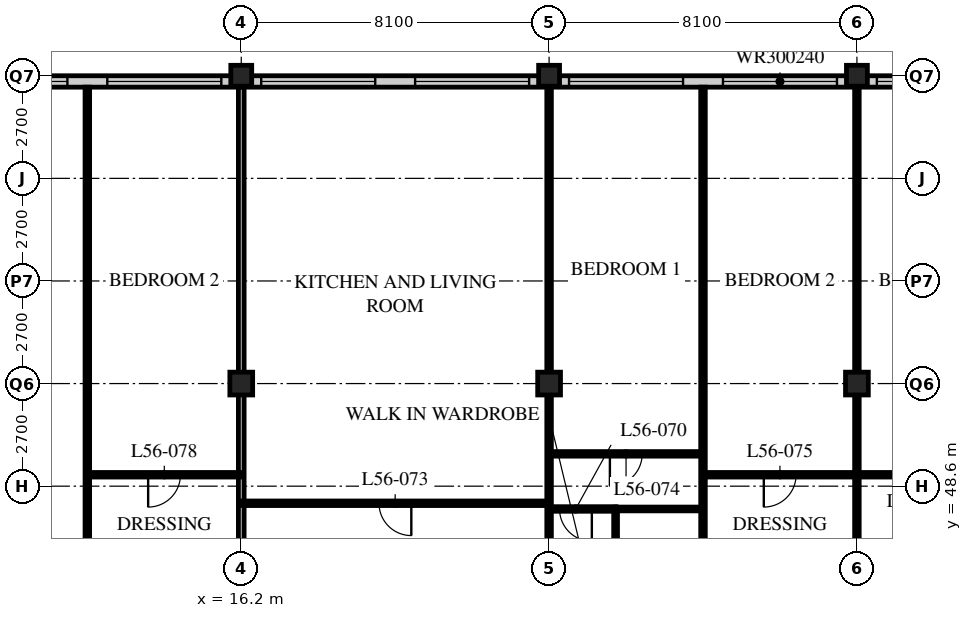
"""IFC4 building model, lengths in metres.
Left out: names, types, materials, properties, quantities, classifications, styles, units other than length and angle.
Written with IfcOpenShell. Run it as: python <this file> out.ifc"""

import sys

from ifc_helpers import new_model, si_unit, direction, frame, frame_2d, origin, origin_2d, place, context, subcontext, project, spatial, rectangle, hollow_rectangle, extrude, element, fill, save


model = new_model("IFC4")
c1 = context("Model", 3, precision=1e-05, world=origin(), true_north=direction((0.0, 1.0)))
c2 = subcontext(c1, "Body", "Model", "MODEL_VIEW")
j1 = project(units=[si_unit("LENGTHUNIT", "METRE"), si_unit("PLANEANGLEUNIT", "RADIAN")], contexts=[c1])
p1 = place(None, origin())
s1 = spatial("IfcSite", under=j1, at=p1, CompositionType="ELEMENT")
p2 = place(p1, origin())
s2 = spatial("IfcBuilding", under=s1, at=p2, CompositionType="ELEMENT")
p3 = place(p2, frame((0.0, 0.0, 217.2)))
s3 = spatial("IfcBuildingStorey", under=s2, at=p3, CompositionType="ELEMENT", Elevation=217.2)
p4 = place(p3, frame((16.2, 51.3, 0.0), z_axis=(0.0, 0.0, 1.0), x_axis=(1.0, 0.0, 0.0)))
e1 = element("IfcColumn", 1, at=p4, inside=s3, PredefinedType="COLUMN", context=c2, shape_type="SweptSolid", body=[
    extrude(hollow_rectangle(XDim=0.6, YDim=0.6, WallThickness=0.05, at=origin_2d()), origin(), (0.0, 0.0, 1.0), 3.6),
])
p5 = place(p3, frame((16.2, 59.4, 0.0), z_axis=(0.0, 0.0, 1.0), x_axis=(1.0, 0.0, 0.0)))
e2 = element("IfcColumn", 2, at=p5, inside=s3, PredefinedType="COLUMN", context=c2, shape_type="SweptSolid", body=[
    extrude(hollow_rectangle(XDim=0.55, YDim=0.55, WallThickness=0.045, at=origin_2d()), origin(), (0.0, 0.0, 1.0), 3.6),
])
p6 = place(p3, frame((24.3, 51.3, 0.0), z_axis=(0.0, 0.0, 1.0), x_axis=(1.0, 0.0, 0.0)))
e3 = element("IfcColumn", 3, at=p6, inside=s3, PredefinedType="COLUMN", context=c2, shape_type="SweptSolid", body=[
    extrude(hollow_rectangle(XDim=0.6, YDim=0.6, WallThickness=0.05, at=origin_2d()), origin(), (0.0, 0.0, 1.0), 3.6),
])
p7 = place(p3, frame((24.3, 59.4, 0.0), z_axis=(0.0, 0.0, 1.0), x_axis=(1.0, 0.0, 0.0)))
e4 = element("IfcColumn", 4, at=p7, inside=s3, PredefinedType="COLUMN", context=c2, shape_type="SweptSolid", body=[
    extrude(hollow_rectangle(XDim=0.55, YDim=0.55, WallThickness=0.045, at=origin_2d()), origin(), (0.0, 0.0, 1.0), 3.6),
])
p8 = place(p3, frame((32.4, 51.3, 0.0), z_axis=(0.0, 0.0, 1.0), x_axis=(1.0, 0.0, 0.0)))
e5 = element("IfcColumn", 5, at=p8, inside=s3, PredefinedType="COLUMN", context=c2, shape_type="SweptSolid", body=[
    extrude(hollow_rectangle(XDim=0.6, YDim=0.6, WallThickness=0.05, at=origin_2d()), origin(), (0.0, 0.0, 1.0), 3.6),
])
p9 = place(p3, frame((32.4, 59.4, 0.0), z_axis=(0.0, 0.0, 1.0), x_axis=(1.0, 0.0, 0.0)))
e6 = element("IfcColumn", 6, at=p9, inside=s3, PredefinedType="COLUMN", context=c2, shape_type="SweptSolid", body=[
    extrude(hollow_rectangle(XDim=0.55, YDim=0.55, WallThickness=0.045, at=origin_2d()), origin(), (0.0, 0.0, 1.0), 3.6),
])
p10 = place(p3, frame((48.3, 59.25, 0.0), z_axis=(0.0, 0.0, 1.0), x_axis=(-1.0, 0.0, 0.0)))
e7 = element("IfcWall", 7, at=p10, inside=s3, PredefinedType="SOLIDWALL", context=c2, shape_type="SweptSolid", body=[
    extrude(rectangle(XDim=40.2, YDim=0.3, at=frame_2d((20.1, 0.0))), origin(), (0.0, 0.0, 1.0), 3.39),
])
p11 = place(p10, frame((0.225, 0.0, 0.6)))
e8 = element("IfcOpeningElement", 8, at=p11, cuts=e7, PredefinedType="OPENING", context=c2, shape_type="SweptSolid", body=[
    extrude(rectangle(XDim=3.0, YDim=2.4, at=frame_2d((1.5, 1.2))), frame((0.0, 0.16, 0.0), z_axis=(0.0, -1.0, 0.0), x_axis=(1.0, 0.0, 0.0)), (0.0, 0.0, 1.0), 0.32),
])
p12 = place(p10, frame((4.275, 0.0, 0.6)))
e9 = element("IfcOpeningElement", 9, at=p12, cuts=e7, PredefinedType="OPENING", context=c2, shape_type="SweptSolid", body=[
    extrude(rectangle(XDim=3.0, YDim=2.4, at=frame_2d((1.5, 1.2))), frame((0.0, 0.16, 0.0), z_axis=(0.0, -1.0, 0.0), x_axis=(1.0, 0.0, 0.0)), (0.0, 0.0, 1.0), 0.32),
])
p13 = place(p10, frame((8.325, 0.0, 0.6)))
e10 = element("IfcOpeningElement", 10, at=p13, cuts=e7, PredefinedType="OPENING", context=c2, shape_type="SweptSolid", body=[
    extrude(rectangle(XDim=3.0, YDim=2.4, at=frame_2d((1.5, 1.2))), frame((0.0, 0.16, 0.0), z_axis=(0.0, -1.0, 0.0), x_axis=(1.0, 0.0, 0.0)), (0.0, 0.0, 1.0), 0.32),
])
p14 = place(p10, frame((12.375, 0.0, 0.6)))
e11 = element("IfcOpeningElement", 11, at=p14, cuts=e7, PredefinedType="OPENING", context=c2, shape_type="SweptSolid", body=[
    extrude(rectangle(XDim=3.0, YDim=2.4, at=frame_2d((1.5, 1.2))), frame((0.0, 0.16, 0.0), z_axis=(0.0, -1.0, 0.0), x_axis=(1.0, 0.0, 0.0)), (0.0, 0.0, 1.0), 0.32),
])
p15 = place(p10, frame((16.425, 0.0, 0.6)))
e12 = element("IfcOpeningElement", 12, at=p15, cuts=e7, PredefinedType="OPENING", context=c2, shape_type="SweptSolid", body=[
    extrude(rectangle(XDim=3.0, YDim=2.4, at=frame_2d((1.5, 1.2))), frame((0.0, 0.16, 0.0), z_axis=(0.0, -1.0, 0.0), x_axis=(1.0, 0.0, 0.0)), (0.0, 0.0, 1.0), 0.32),
])
p16 = place(p10, frame((20.475, 0.0, 0.6)))
e13 = element("IfcOpeningElement", 13, at=p16, cuts=e7, PredefinedType="OPENING", context=c2, shape_type="SweptSolid", body=[
    extrude(rectangle(XDim=3.0, YDim=2.4, at=frame_2d((1.5, 1.2))), frame((0.0, 0.16, 0.0), z_axis=(0.0, -1.0, 0.0), x_axis=(1.0, 0.0, 0.0)), (0.0, 0.0, 1.0), 0.32),
])
p17 = place(p10, frame((24.525, 0.0, 0.6)))
e14 = element("IfcOpeningElement", 14, at=p17, cuts=e7, PredefinedType="OPENING", context=c2, shape_type="SweptSolid", body=[
    extrude(rectangle(XDim=3.0, YDim=2.4, at=frame_2d((1.5, 1.2))), frame((0.0, 0.16, 0.0), z_axis=(0.0, -1.0, 0.0), x_axis=(1.0, 0.0, 0.0)), (0.0, 0.0, 1.0), 0.32),
])
p18 = place(p10, frame((28.575, 0.0, 0.6)))
e15 = element("IfcOpeningElement", 15, at=p18, cuts=e7, PredefinedType="OPENING", context=c2, shape_type="SweptSolid", body=[
    extrude(rectangle(XDim=3.0, YDim=2.4, at=frame_2d((1.5, 1.2))), frame((0.0, 0.16, 0.0), z_axis=(0.0, -1.0, 0.0), x_axis=(1.0, 0.0, 0.0)), (0.0, 0.0, 1.0), 0.32),
])
p19 = place(p10, frame((32.625, 0.0, 0.6)))
e16 = element("IfcOpeningElement", 16, at=p19, cuts=e7, PredefinedType="OPENING", context=c2, shape_type="SweptSolid", body=[
    extrude(rectangle(XDim=3.0, YDim=2.4, at=frame_2d((1.5, 1.2))), frame((0.0, 0.16, 0.0), z_axis=(0.0, -1.0, 0.0), x_axis=(1.0, 0.0, 0.0)), (0.0, 0.0, 1.0), 0.32),
])
p20 = place(p10, frame((36.675, 0.0, 0.6)))
e17 = element("IfcOpeningElement", 17, at=p20, cuts=e7, PredefinedType="OPENING", context=c2, shape_type="SweptSolid", body=[
    extrude(rectangle(XDim=3.0, YDim=2.4, at=frame_2d((1.5, 1.2))), frame((0.0, 0.16, 0.0), z_axis=(0.0, -1.0, 0.0), x_axis=(1.0, 0.0, 0.0)), (0.0, 0.0, 1.0), 0.32),
])
p21 = place(p3, frame((26.05, 45.6, 0.0), z_axis=(0.0, 0.0, 1.0), x_axis=(0.0, 1.0, 0.0)))
e18 = element("IfcWall", 18, at=p21, inside=s3, PredefinedType="PARTITIONING", context=c2, shape_type="SweptSolid", body=[
    extrude(rectangle(XDim=2.4, YDim=0.1, at=frame_2d((1.2, 0.0))), origin(), (0.0, 0.0, 1.0), 3.39),
])
p22 = place(p21, frame((0.8, 0.0, 0.0)))
e19 = element("IfcOpeningElement", 19, at=p22, cuts=e18, PredefinedType="OPENING", context=c2, shape_type="SweptSolid", body=[
    extrude(rectangle(XDim=0.8, YDim=2.1, at=frame_2d((0.4, 1.05))), frame((0.0, 0.06, 0.0), z_axis=(0.0, -1.0, 0.0), x_axis=(1.0, 0.0, 0.0)), (0.0, 0.0, 1.0), 0.12),
])
p23 = place(p3, frame((26.05, 48.0, 0.0), z_axis=(0.0, 0.0, 1.0), x_axis=(1.0, 0.0, 0.0)))
e20 = element("IfcWall", 20, at=p23, inside=s3, PredefinedType="PARTITIONING", context=c2, shape_type="SweptSolid", body=[
    extrude(rectangle(XDim=2.3, YDim=0.1, at=frame_2d((1.15, 0.0))), origin(), (0.0, 0.0, 1.0), 3.39),
])
p24 = place(p3, frame((24.3, 45.6, 0.0), z_axis=(0.0, 0.0, 1.0), x_axis=(0.0, 1.0, 0.0)))
e21 = element("IfcWall", 21, at=p24, inside=s3, PredefinedType="PARTITIONING", context=c2, shape_type="SweptSolid", body=[
    extrude(rectangle(XDim=13.5, YDim=0.12, at=frame_2d((6.75, 0.0))), origin(), (0.0, 0.0, 1.0), 2.778),
])
p25 = place(p3, frame((28.35, 45.6, 0.0), z_axis=(0.0, 0.0, 1.0), x_axis=(0.0, 1.0, 0.0)))
e22 = element("IfcWall", 22, at=p25, inside=s3, PredefinedType="PARTITIONING", context=c2, shape_type="SweptSolid", body=[
    extrude(rectangle(XDim=13.5, YDim=0.12, at=frame_2d((6.75, 0.0))), origin(), (0.0, 0.0, 1.0), 3.39),
])
p26 = place(p3, frame((32.4, 45.6, 0.0), z_axis=(0.0, 0.0, 1.0), x_axis=(0.0, 1.0, 0.0)))
e23 = element("IfcWall", 23, at=p26, inside=s3, PredefinedType="PARTITIONING", context=c2, shape_type="SweptSolid", body=[
    extrude(rectangle(XDim=13.5, YDim=0.12, at=frame_2d((6.75, 0.0))), origin(), (0.0, 0.0, 1.0), 2.778),
])
p27 = place(p3, frame((12.15, 45.6, 0.0), z_axis=(0.0, 0.0, 1.0), x_axis=(0.0, 1.0, 0.0)))
e24 = element("IfcWall", 24, at=p27, inside=s3, PredefinedType="PARTITIONING", context=c2, shape_type="SweptSolid", body=[
    extrude(rectangle(XDim=13.5, YDim=0.12, at=frame_2d((6.75, 0.0))), origin(), (0.0, 0.0, 1.0), 3.39),
])
p28 = place(p3, frame((16.2, 43.2, 0.0), z_axis=(0.0, 0.0, 1.0), x_axis=(0.0, 1.0, 0.0)))
e25 = element("IfcWall", 25, at=p28, inside=s3, PredefinedType="PARTITIONING", context=c2, shape_type="SweptSolid", body=[
    extrude(rectangle(XDim=15.9, YDim=0.15, at=frame_2d((7.95, 0.0))), origin(), (0.0, 0.0, 1.0), 2.778),
])
p29 = place(p3, frame((24.3, 48.0, 0.0), z_axis=(0.0, 0.0, 1.0), x_axis=(1.0, 0.0, 0.0)))
e26 = element("IfcWall", 26, at=p29, inside=s3, PredefinedType="PARTITIONING", context=c2, shape_type="SweptSolid", body=[
    extrude(rectangle(XDim=1.76, YDim=0.12, at=frame_2d((0.88, 0.0))), origin(), (0.0, 0.0, 1.0), 3.39),
])
p30 = place(p29, frame((0.275, 0.0, 0.0)))
e27 = element("IfcOpeningElement", 27, at=p30, cuts=e26, PredefinedType="OPENING", context=c2, shape_type="SweptSolid", body=[
    extrude(rectangle(XDim=0.85, YDim=2.1, at=frame_2d((0.425, 1.05))), frame((0.0, 0.07, 0.0), z_axis=(0.0, -1.0, 0.0), x_axis=(1.0, 0.0, 0.0)), (0.0, 0.0, 1.0), 0.14),
])
p31 = place(p3, frame((16.2, 48.15, 0.0), z_axis=(0.0, 0.0, 1.0), x_axis=(1.0, 0.0, 0.0)))
e28 = element("IfcWall", 28, at=p31, inside=s3, PredefinedType="PARTITIONING", context=c2, shape_type="SweptSolid", body=[
    extrude(rectangle(XDim=8.1, YDim=0.12, at=frame_2d((4.05, 0.0))), origin(), (0.0, 0.0, 1.0), 3.39),
])
p32 = place(p31, frame((3.625, 0.0, 0.0)))
e29 = element("IfcOpeningElement", 29, at=p32, cuts=e28, PredefinedType="OPENING", context=c2, shape_type="SweptSolid", body=[
    extrude(rectangle(XDim=0.85, YDim=2.1, at=frame_2d((0.425, 1.05))), frame((0.0, 0.07, 0.0), z_axis=(0.0, -1.0, 0.0), x_axis=(1.0, 0.0, 0.0)), (0.0, 0.0, 1.0), 0.14),
])
p33 = place(p3, frame((24.3, 49.45, 0.0), z_axis=(0.0, 0.0, 1.0), x_axis=(1.0, 0.0, 0.0)))
e30 = element("IfcWall", 30, at=p33, inside=s3, PredefinedType="PARTITIONING", context=c2, shape_type="SweptSolid", body=[
    extrude(rectangle(XDim=4.05, YDim=0.12, at=frame_2d((2.025, 0.0))), origin(), (0.0, 0.0, 1.0), 3.39),
])
p34 = place(p33, frame((1.6, 0.0, 0.0)))
e31 = element("IfcOpeningElement", 31, at=p34, cuts=e30, PredefinedType="OPENING", context=c2, shape_type="SweptSolid", body=[
    extrude(rectangle(XDim=0.85, YDim=2.1, at=frame_2d((0.425, 1.05))), frame((0.0, 0.07, 0.0), z_axis=(0.0, -1.0, 0.0), x_axis=(1.0, 0.0, 0.0)), (0.0, 0.0, 1.0), 0.14),
])
p35 = place(p3, frame((28.35, 48.9, 0.0), z_axis=(0.0, 0.0, 1.0), x_axis=(1.0, 0.0, 0.0)))
e32 = element("IfcWall", 32, at=p35, inside=s3, PredefinedType="PARTITIONING", context=c2, shape_type="SweptSolid", body=[
    extrude(rectangle(XDim=8.1, YDim=0.12, at=frame_2d((4.05, 0.0))), origin(), (0.0, 0.0, 1.0), 3.39),
])
p36 = place(p35, frame((1.6, 0.0, 0.0)))
e33 = element("IfcOpeningElement", 33, at=p36, cuts=e32, PredefinedType="OPENING", context=c2, shape_type="SweptSolid", body=[
    extrude(rectangle(XDim=0.85, YDim=2.1, at=frame_2d((0.425, 1.05))), frame((0.0, 0.07, 0.0), z_axis=(0.0, -1.0, 0.0), x_axis=(1.0, 0.0, 0.0)), (0.0, 0.0, 1.0), 0.14),
])
p37 = place(p35, frame((5.65, 0.0, 0.0)))
e34 = element("IfcOpeningElement", 34, at=p37, cuts=e32, PredefinedType="OPENING", context=c2, shape_type="SweptSolid", body=[
    extrude(rectangle(XDim=0.85, YDim=2.1, at=frame_2d((0.425, 1.05))), frame((0.0, 0.07, 0.0), z_axis=(0.0, -1.0, 0.0), x_axis=(1.0, 0.0, 0.0)), (0.0, 0.0, 1.0), 0.14),
])
p38 = place(p3, frame((12.15, 48.9, 0.0), z_axis=(0.0, 0.0, 1.0), x_axis=(1.0, 0.0, 0.0)))
e35 = element("IfcWall", 35, at=p38, inside=s3, PredefinedType="PARTITIONING", context=c2, shape_type="SweptSolid", body=[
    extrude(rectangle(XDim=4.05, YDim=0.12, at=frame_2d((2.025, 0.0))), origin(), (0.0, 0.0, 1.0), 3.39),
])
p39 = place(p38, frame((1.6, 0.0, 0.0)))
e36 = element("IfcOpeningElement", 36, at=p39, cuts=e35, PredefinedType="OPENING", context=c2, shape_type="SweptSolid", body=[
    extrude(rectangle(XDim=0.85, YDim=2.1, at=frame_2d((0.425, 1.05))), frame((0.0, 0.07, 0.0), z_axis=(0.0, -1.0, 0.0), x_axis=(1.0, 0.0, 0.0)), (0.0, 0.0, 1.0), 0.14),
])
p40 = place(p14, origin())
e37 = element("IfcWindow", 37, at=p40, inside=s3, PartitioningType="SINGLE_PANEL", PredefinedType="WINDOW", context=c2, shape_type="SweptSolid", body=[
    extrude(rectangle(XDim=3.0, YDim=2.4, at=frame_2d((1.5, 1.2))), frame((0.0, 0.03, 0.0), z_axis=(0.0, -1.0, 0.0), x_axis=(1.0, 0.0, 0.0)), (0.0, 0.0, 1.0), 0.06),
])
fill(e11, e37)
p41 = place(p15, origin())
e38 = element("IfcWindow", 38, at=p41, inside=s3, PartitioningType="SINGLE_PANEL", PredefinedType="WINDOW", context=c2, shape_type="SweptSolid", body=[
    extrude(rectangle(XDim=3.0, YDim=2.4, at=frame_2d((1.5, 1.2))), frame((0.0, 0.03, 0.0), z_axis=(0.0, -1.0, 0.0), x_axis=(1.0, 0.0, 0.0)), (0.0, 0.0, 1.0), 0.06),
])
fill(e12, e38)
p42 = place(p16, origin())
e39 = element("IfcWindow", 39, at=p42, inside=s3, PartitioningType="SINGLE_PANEL", PredefinedType="WINDOW", context=c2, shape_type="SweptSolid", body=[
    extrude(rectangle(XDim=3.0, YDim=2.4, at=frame_2d((1.5, 1.2))), frame((0.0, 0.03, 0.0), z_axis=(0.0, -1.0, 0.0), x_axis=(1.0, 0.0, 0.0)), (0.0, 0.0, 1.0), 0.06),
])
fill(e13, e39)
p43 = place(p17, origin())
e40 = element("IfcWindow", 40, at=p43, inside=s3, PartitioningType="SINGLE_PANEL", PredefinedType="WINDOW", context=c2, shape_type="SweptSolid", body=[
    extrude(rectangle(XDim=3.0, YDim=2.4, at=frame_2d((1.5, 1.2))), frame((0.0, 0.03, 0.0), z_axis=(0.0, -1.0, 0.0), x_axis=(1.0, 0.0, 0.0)), (0.0, 0.0, 1.0), 0.06),
])
fill(e14, e40)
p44 = place(p18, origin())
e41 = element("IfcWindow", 41, at=p44, inside=s3, PartitioningType="SINGLE_PANEL", PredefinedType="WINDOW", context=c2, shape_type="SweptSolid", body=[
    extrude(rectangle(XDim=3.0, YDim=2.4, at=frame_2d((1.5, 1.2))), frame((0.0, 0.03, 0.0), z_axis=(0.0, -1.0, 0.0), x_axis=(1.0, 0.0, 0.0)), (0.0, 0.0, 1.0), 0.06),
])
fill(e15, e41)
p45 = place(p19, origin())
e42 = element("IfcWindow", 42, at=p45, inside=s3, PartitioningType="SINGLE_PANEL", PredefinedType="WINDOW", context=c2, shape_type="SweptSolid", body=[
    extrude(rectangle(XDim=3.0, YDim=2.4, at=frame_2d((1.5, 1.2))), frame((0.0, 0.03, 0.0), z_axis=(0.0, -1.0, 0.0), x_axis=(1.0, 0.0, 0.0)), (0.0, 0.0, 1.0), 0.06),
])
fill(e16, e42)
p46 = place(p20, origin())
e43 = element("IfcWindow", 43, at=p46, inside=s3, PartitioningType="SINGLE_PANEL", PredefinedType="WINDOW", context=c2, shape_type="SweptSolid", body=[
    extrude(rectangle(XDim=3.0, YDim=2.4, at=frame_2d((1.5, 1.2))), frame((0.0, 0.03, 0.0), z_axis=(0.0, -1.0, 0.0), x_axis=(1.0, 0.0, 0.0)), (0.0, 0.0, 1.0), 0.06),
])
fill(e17, e43)
p47 = place(p30, origin())
e44 = element("IfcDoor", 44, at=p47, inside=s3, OperationType="SINGLE_SWING_LEFT", PredefinedType="DOOR", context=c2, shape_type="SweptSolid", body=[
    extrude(rectangle(XDim=0.85, YDim=2.1, at=frame_2d((0.425, 1.05))), frame((0.0, 0.025, 0.0), z_axis=(0.0, -1.0, 0.0), x_axis=(1.0, 0.0, 0.0)), (0.0, 0.0, 1.0), 0.05),
])
fill(e27, e44)
p48 = place(p32, origin())
e45 = element("IfcDoor", 45, at=p48, inside=s3, OperationType="SINGLE_SWING_LEFT", PredefinedType="DOOR", context=c2, shape_type="SweptSolid", body=[
    extrude(rectangle(XDim=0.85, YDim=2.1, at=frame_2d((0.425, 1.05))), frame((0.0, 0.025, 0.0), z_axis=(0.0, -1.0, 0.0), x_axis=(1.0, 0.0, 0.0)), (0.0, 0.0, 1.0), 0.05),
])
fill(e29, e45)
p49 = place(p34, origin())
e46 = element("IfcDoor", 46, at=p49, inside=s3, OperationType="SINGLE_SWING_RIGHT", PredefinedType="DOOR", context=c2, shape_type="SweptSolid", body=[
    extrude(rectangle(XDim=0.85, YDim=2.1, at=frame_2d((0.425, 1.05))), frame((0.0, 0.025, 0.0), z_axis=(0.0, -1.0, 0.0), x_axis=(1.0, 0.0, 0.0)), (0.0, 0.0, 1.0), 0.05),
])
fill(e31, e46)
p50 = place(p36, origin())
e47 = element("IfcDoor", 47, at=p50, inside=s3, OperationType="SINGLE_SWING_RIGHT", PredefinedType="DOOR", context=c2, shape_type="SweptSolid", body=[
    extrude(rectangle(XDim=0.85, YDim=2.1, at=frame_2d((0.425, 1.05))), frame((0.0, 0.025, 0.0), z_axis=(0.0, -1.0, 0.0), x_axis=(1.0, 0.0, 0.0)), (0.0, 0.0, 1.0), 0.05),
])
fill(e33, e47)
p51 = place(p39, origin())
e48 = element("IfcDoor", 48, at=p51, inside=s3, OperationType="SINGLE_SWING_RIGHT", PredefinedType="DOOR", context=c2, shape_type="SweptSolid", body=[
    extrude(rectangle(XDim=0.85, YDim=2.1, at=frame_2d((0.425, 1.05))), frame((0.0, 0.025, 0.0), z_axis=(0.0, -1.0, 0.0), x_axis=(1.0, 0.0, 0.0)), (0.0, 0.0, 1.0), 0.05),
])
fill(e36, e48)
save(model, sys.argv[1])
